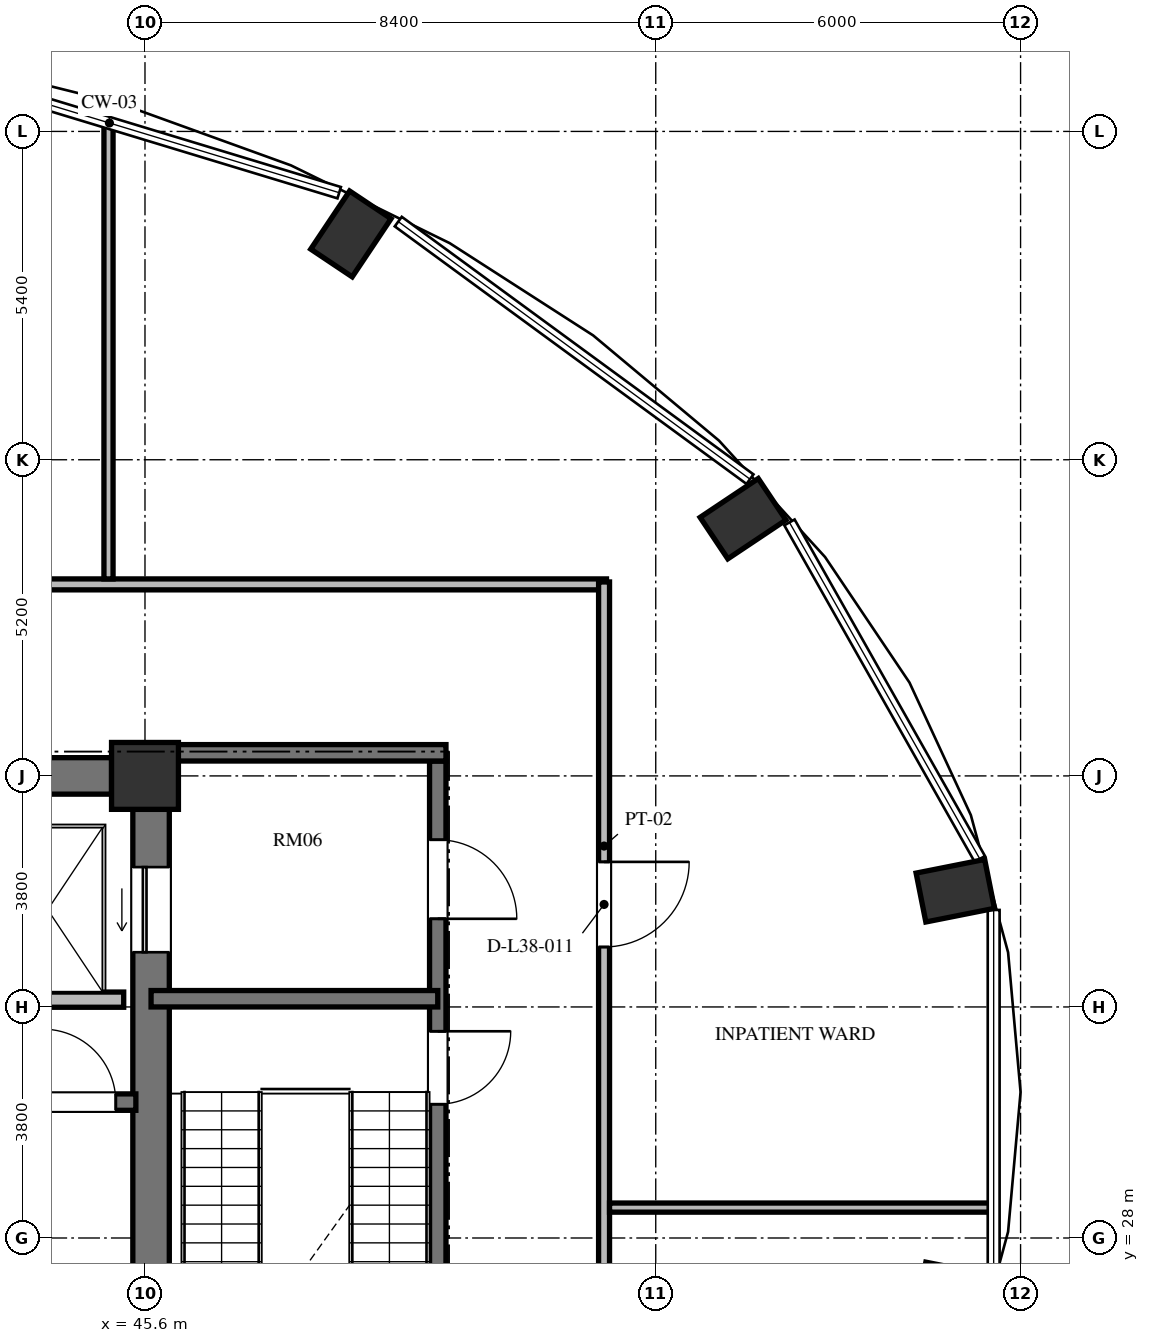
"""IFC4 building model, lengths in metres.
Left out: names, types, materials, properties, quantities, classifications, styles, units other than length and angle.
Written with IfcOpenShell. Run it as: python <this file> out.ifc"""

import sys

from ifc_helpers import new_model, si_unit, direction, frame, frame_2d, origin, origin_2d, place, context, subcontext, project, spatial, rectangle, extrude, element, fill, save


model = new_model("IFC4")
c1 = context("Model", 3, precision=1e-05, world=origin(), true_north=direction((0.0, 1.0)))
c2 = subcontext(c1, "Body", "Model", "MODEL_VIEW")
j1 = project(units=[si_unit("LENGTHUNIT", "METRE"), si_unit("PLANEANGLEUNIT", "RADIAN")], contexts=[c1])
p1 = place(None, origin())
s1 = spatial("IfcSite", under=j1, at=p1, CompositionType="ELEMENT")
p2 = place(p1, origin())
s2 = spatial("IfcBuilding", under=s1, at=p2, CompositionType="ELEMENT")
p3 = place(p2, frame((0.0, 0.0, 149.232)))
s3 = spatial("IfcBuildingStorey", under=s2, at=p3, CompositionType="ELEMENT", Elevation=149.232)
for number, where, z_axis, x_axis in (
    (1, (58.926, 27.088, 0.0), (0.0, 0.0, 1.0), (0.981, -0.195, 0.0)),
    (2, (58.926, 33.712, 0.0), (0.0, 0.0, 1.0), (0.981, 0.195, 0.0)),
    (3, (55.436, 39.831, 0.0), (0.0, 0.0, 1.0), (0.831, 0.556, 0.0)),
    (4, (48.987, 44.514, 0.0), (0.0, 0.0, 1.0), (0.556, 0.831, 0.0)),
):
    element("IfcColumn", number, at=place(p3, frame(where, z_axis=z_axis, x_axis=x_axis)), inside=s3, PredefinedType="COLUMN", context=c2, shape_type="SweptSolid", body=[
        extrude(rectangle(XDim=1.15, YDim=0.82, at=origin_2d()), origin(), (0.0, 0.0, 1.0), 3.648),
    ])
p4 = place(p3, frame((45.6, 35.6, 0.0), z_axis=(0.0, 0.0, 1.0), x_axis=(1.0, 0.0, 0.0)))
e5 = element("IfcColumn", 5, at=p4, inside=s3, PredefinedType="COLUMN", context=c2, shape_type="SweptSolid", body=[
    extrude(rectangle(XDim=1.1, YDim=1.1, at=origin_2d()), origin(), (0.0, 0.0, 1.0), 3.648),
])
p5 = place(p3, frame((45.7, 20.95, 0.0), z_axis=(0.0, 0.0, 1.0), x_axis=(0.0, 1.0, 0.0)))
e6 = element("IfcWall", 6, at=p5, inside=s3, PredefinedType="SHEAR", context=c2, shape_type="SweptSolid", body=[
    extrude(rectangle(XDim=14.1, YDim=0.6, at=frame_2d((7.05, 0.0))), origin(), (0.0, 0.0, 1.0), 3.648),
])
p6 = place(p5, frame((11.75, 0.0, 0.0)))
e7 = element("IfcOpeningElement", 7, at=p6, cuts=e6, PredefinedType="OPENING", context=c2, shape_type="SweptSolid", body=[
    extrude(rectangle(XDim=1.4, YDim=2.3, at=frame_2d((0.7, 1.15))), frame((0.0, 0.31, 0.0), z_axis=(0.0, -1.0, 0.0), x_axis=(1.0, 0.0, 0.0)), (0.0, 0.0, 1.0), 0.62),
])
p7 = place(p5, frame((0.95, 0.0, 0.0)))
e8 = element("IfcOpeningElement", 8, at=p7, cuts=e6, PredefinedType="OPENING", context=c2, shape_type="SweptSolid", body=[
    extrude(rectangle(XDim=1.4, YDim=2.3, at=frame_2d((0.7, 1.15))), frame((0.0, 0.31, 0.0), z_axis=(0.0, -1.0, 0.0), x_axis=(1.0, 0.0, 0.0)), (0.0, 0.0, 1.0), 0.62),
])
p8 = place(p3, frame((39.675, 35.6, 0.0), z_axis=(0.0, 0.0, 1.0), x_axis=(1.0, 0.0, 0.0)))
e9 = element("IfcWall", 9, at=p8, inside=s3, PredefinedType="SHEAR", context=c2, shape_type="SweptSolid", body=[
    extrude(rectangle(XDim=5.375, YDim=0.6, at=frame_2d((2.688, 0.0))), origin(), (0.0, 0.0, 1.0), 3.648),
])
p9 = place(p3, frame((37.465, 30.235, 0.0), z_axis=(0.0, 0.0, 1.0), x_axis=(1.0, 0.0, 0.0)))
e10 = element("IfcWall", 10, at=p9, inside=s3, PredefinedType="SHEAR", context=c2, shape_type="SweptSolid", body=[
    extrude(rectangle(XDim=7.985, YDim=0.27, at=frame_2d((3.992, 0.0))), origin(), (0.0, 0.0, 1.0), 3.648),
])
p10 = place(p9, frame((6.455, 0.0, 0.0)))
e11 = element("IfcOpeningElement", 11, at=p10, cuts=e10, PredefinedType="OPENING", context=c2, shape_type="SweptSolid", body=[
    extrude(rectangle(XDim=1.2, YDim=2.15, at=frame_2d((0.6, 1.075))), frame((0.0, 0.145, 0.0), z_axis=(0.0, -1.0, 0.0), x_axis=(1.0, 0.0, 0.0)), (0.0, 0.0, 1.0), 0.29),
])
p11 = place(p3, frame((42.95, 31.92, 0.0), z_axis=(0.0, 0.0, 1.0), x_axis=(1.0, 0.0, 0.0)))
e12 = element("IfcWall", 12, at=p11, inside=s3, PredefinedType="SOLIDWALL", context=c2, shape_type="SweptSolid", body=[
    extrude(rectangle(XDim=2.3, YDim=0.25, at=frame_2d((1.15, 0.0))), origin(), (0.0, 0.0, 1.0), 3.428),
])
p12 = place(p3, frame((50.415, 35.845, 0.0), z_axis=(0.0, 0.0, 1.0), x_axis=(0.0, -1.0, 0.0)))
e13 = element("IfcWall", 13, at=p12, inside=s3, PredefinedType="SHEAR", context=c2, shape_type="SweptSolid", body=[
    extrude(rectangle(XDim=15.825, YDim=0.27, at=frame_2d((7.913, 0.0))), origin(), (0.0, 0.0, 1.0), 3.648),
])
p13 = place(p12, frame((4.445, 0.0, 0.0)))
e14 = element("IfcOpeningElement", 14, at=p13, cuts=e13, PredefinedType="OPENING", context=c2, shape_type="SweptSolid", body=[
    extrude(rectangle(XDim=1.2, YDim=2.15, at=frame_2d((0.6, 1.075))), frame((0.0, 0.145, 0.0), z_axis=(0.0, -1.0, 0.0), x_axis=(1.0, 0.0, 0.0)), (0.0, 0.0, 1.0), 0.29),
])
p14 = place(p12, frame((1.295, 0.0, 0.0)))
e15 = element("IfcOpeningElement", 15, at=p14, cuts=e13, PredefinedType="OPENING", context=c2, shape_type="SweptSolid", body=[
    extrude(rectangle(XDim=1.3, YDim=2.2, at=frame_2d((0.65, 1.1))), frame((0.0, 0.145, 0.0), z_axis=(0.0, -1.0, 0.0), x_axis=(1.0, 0.0, 0.0)), (0.0, 0.0, 1.0), 0.29),
])
p15 = place(p12, frame((13.095, 0.0, 0.0)))
e16 = element("IfcOpeningElement", 16, at=p15, cuts=e13, PredefinedType="OPENING", context=c2, shape_type="SweptSolid", body=[
    extrude(rectangle(XDim=1.3, YDim=2.2, at=frame_2d((0.65, 1.1))), frame((0.0, 0.145, 0.0), z_axis=(0.0, -1.0, 0.0), x_axis=(1.0, 0.0, 0.0)), (0.0, 0.0, 1.0), 0.29),
])
p16 = place(p3, frame((46.0, 35.98, 0.0), z_axis=(0.0, 0.0, 1.0), x_axis=(1.0, 0.0, 0.0)))
e17 = element("IfcWall", 17, at=p16, inside=s3, PredefinedType="SHEAR", context=c2, shape_type="SweptSolid", body=[
    extrude(rectangle(XDim=4.55, YDim=0.27, at=frame_2d((2.275, 0.0))), origin(), (0.0, 0.0, 1.0), 3.648),
])
p17 = place(p3, frame((45.7, 31.935, 0.0), z_axis=(0.0, 0.0, 1.0), x_axis=(1.0, 0.0, 0.0)))
e18 = element("IfcWall", 18, at=p17, inside=s3, PredefinedType="SHEAR", context=c2, shape_type="SweptSolid", body=[
    extrude(rectangle(XDim=4.715, YDim=0.27, at=frame_2d((2.357, 0.0))), origin(), (0.0, 0.0, 1.0), 3.648),
])
p18 = place(p3, frame((39.46, 38.75, 0.0), z_axis=(0.0, 0.0, 1.0), x_axis=(1.0, 0.0, 0.0)))
e19 = element("IfcWall", 19, at=p18, inside=s3, PredefinedType="PARTITIONING", context=c2, shape_type="SweptSolid", body=[
    extrude(rectangle(XDim=13.73, YDim=0.18, at=frame_2d((6.865, 0.0))), origin(), (0.0, 0.0, 1.0), 3.428),
])
p19 = place(p3, frame((53.15, 38.79, 0.0), z_axis=(0.0, 0.0, 1.0), x_axis=(0.0, -1.0, 0.0)))
e20 = element("IfcWall", 20, at=p19, inside=s3, PredefinedType="PARTITIONING", context=c2, shape_type="SweptSolid", body=[
    extrude(rectangle(XDim=17.374, YDim=0.18, at=frame_2d((8.687, 0.0))), origin(), (0.0, 0.0, 1.0), 3.428),
])
p20 = place(p19, frame((13.148, 0.0, 0.0)))
e21 = element("IfcOpeningElement", 21, at=p20, cuts=e20, PredefinedType="OPENING", context=c2, shape_type="SweptSolid", body=[
    extrude(rectangle(XDim=1.05, YDim=2.15, at=frame_2d((0.525, 1.075))), frame((0.0, 0.1, 0.0), z_axis=(0.0, -1.0, 0.0), x_axis=(1.0, 0.0, 0.0)), (0.0, 0.0, 1.0), 0.2),
])
p21 = place(p19, frame((4.604, 0.0, 0.0)))
e22 = element("IfcOpeningElement", 22, at=p21, cuts=e20, PredefinedType="OPENING", context=c2, shape_type="SweptSolid", body=[
    extrude(rectangle(XDim=1.4, YDim=2.2, at=frame_2d((0.7, 1.1))), frame((0.0, 0.1, 0.0), z_axis=(0.0, -1.0, 0.0), x_axis=(1.0, 0.0, 0.0)), (0.0, 0.0, 1.0), 0.2),
])
p22 = place(p3, frame((53.24, 28.5, 0.0), z_axis=(0.0, 0.0, 1.0), x_axis=(1.0, 0.0, 0.0)))
e23 = element("IfcWall", 23, at=p22, inside=s3, PredefinedType="PARTITIONING", context=c2, shape_type="SweptSolid", body=[
    extrude(rectangle(XDim=6.307, YDim=0.15, at=frame_2d((3.154, 0.0))), origin(), (0.0, 0.0, 1.0), 3.428),
])
p23 = place(p3, frame((45.0, 38.84, 0.0), z_axis=(0.0, 0.0, 1.0), x_axis=(0.0, 1.0, 0.0)))
e24 = element("IfcWall", 24, at=p23, inside=s3, PredefinedType="PARTITIONING", context=c2, shape_type="SweptSolid", body=[
    extrude(rectangle(XDim=7.488, YDim=0.15, at=frame_2d((3.744, 0.0))), origin(), (0.0, 0.0, 1.0), 3.428),
])
p24 = place(p10, origin())
e25 = element("IfcDoor", 25, at=p24, inside=s3, OperationType="SINGLE_SWING_LEFT", PredefinedType="DOOR", context=c2, shape_type="SweptSolid", body=[
    extrude(rectangle(XDim=1.2, YDim=2.15, at=frame_2d((0.6, 1.075))), frame((0.0, 0.025, 0.0), z_axis=(0.0, -1.0, 0.0), x_axis=(1.0, 0.0, 0.0)), (0.0, 0.0, 1.0), 0.05),
])
fill(e11, e25)
p25 = place(p6, origin())
e26 = element("IfcDoor", 26, at=p25, inside=s3, OperationType="SLIDING_TO_LEFT", PredefinedType="DOOR", context=c2, shape_type="SweptSolid", body=[
    extrude(rectangle(XDim=1.4, YDim=2.3, at=frame_2d((0.7, 1.15))), frame((0.0, 0.025, 0.0), z_axis=(0.0, -1.0, 0.0), x_axis=(1.0, 0.0, 0.0)), (0.0, 0.0, 1.0), 0.05),
])
fill(e7, e26)
p26 = place(p13, origin())
e27 = element("IfcDoor", 27, at=p26, inside=s3, OperationType="SINGLE_SWING_LEFT", PredefinedType="DOOR", context=c2, shape_type="SweptSolid", body=[
    extrude(rectangle(XDim=1.2, YDim=2.15, at=frame_2d((0.6, 1.075))), frame((0.0, 0.025, 0.0), z_axis=(0.0, -1.0, 0.0), x_axis=(1.0, 0.0, 0.0)), (0.0, 0.0, 1.0), 0.05),
])
fill(e14, e27)
p27 = place(p14, origin())
e28 = element("IfcDoor", 28, at=p27, inside=s3, OperationType="SINGLE_SWING_RIGHT", PredefinedType="DOOR", context=c2, shape_type="SweptSolid", body=[
    extrude(rectangle(XDim=1.3, YDim=2.2, at=frame_2d((0.65, 1.1))), frame((0.0, 0.025, 0.0), z_axis=(0.0, -1.0, 0.0), x_axis=(1.0, 0.0, 0.0)), (0.0, 0.0, 1.0), 0.05),
])
fill(e15, e28)
p28 = place(p21, origin())
e29 = element("IfcDoor", 29, at=p28, inside=s3, OperationType="SINGLE_SWING_LEFT", PredefinedType="DOOR", context=c2, shape_type="SweptSolid", body=[
    extrude(rectangle(XDim=1.4, YDim=2.2, at=frame_2d((0.7, 1.1))), frame((0.0, 0.025, 0.0), z_axis=(0.0, -1.0, 0.0), x_axis=(1.0, 0.0, 0.0)), (0.0, 0.0, 1.0), 0.05),
])
fill(e22, e29)
save(model, sys.argv[1])
